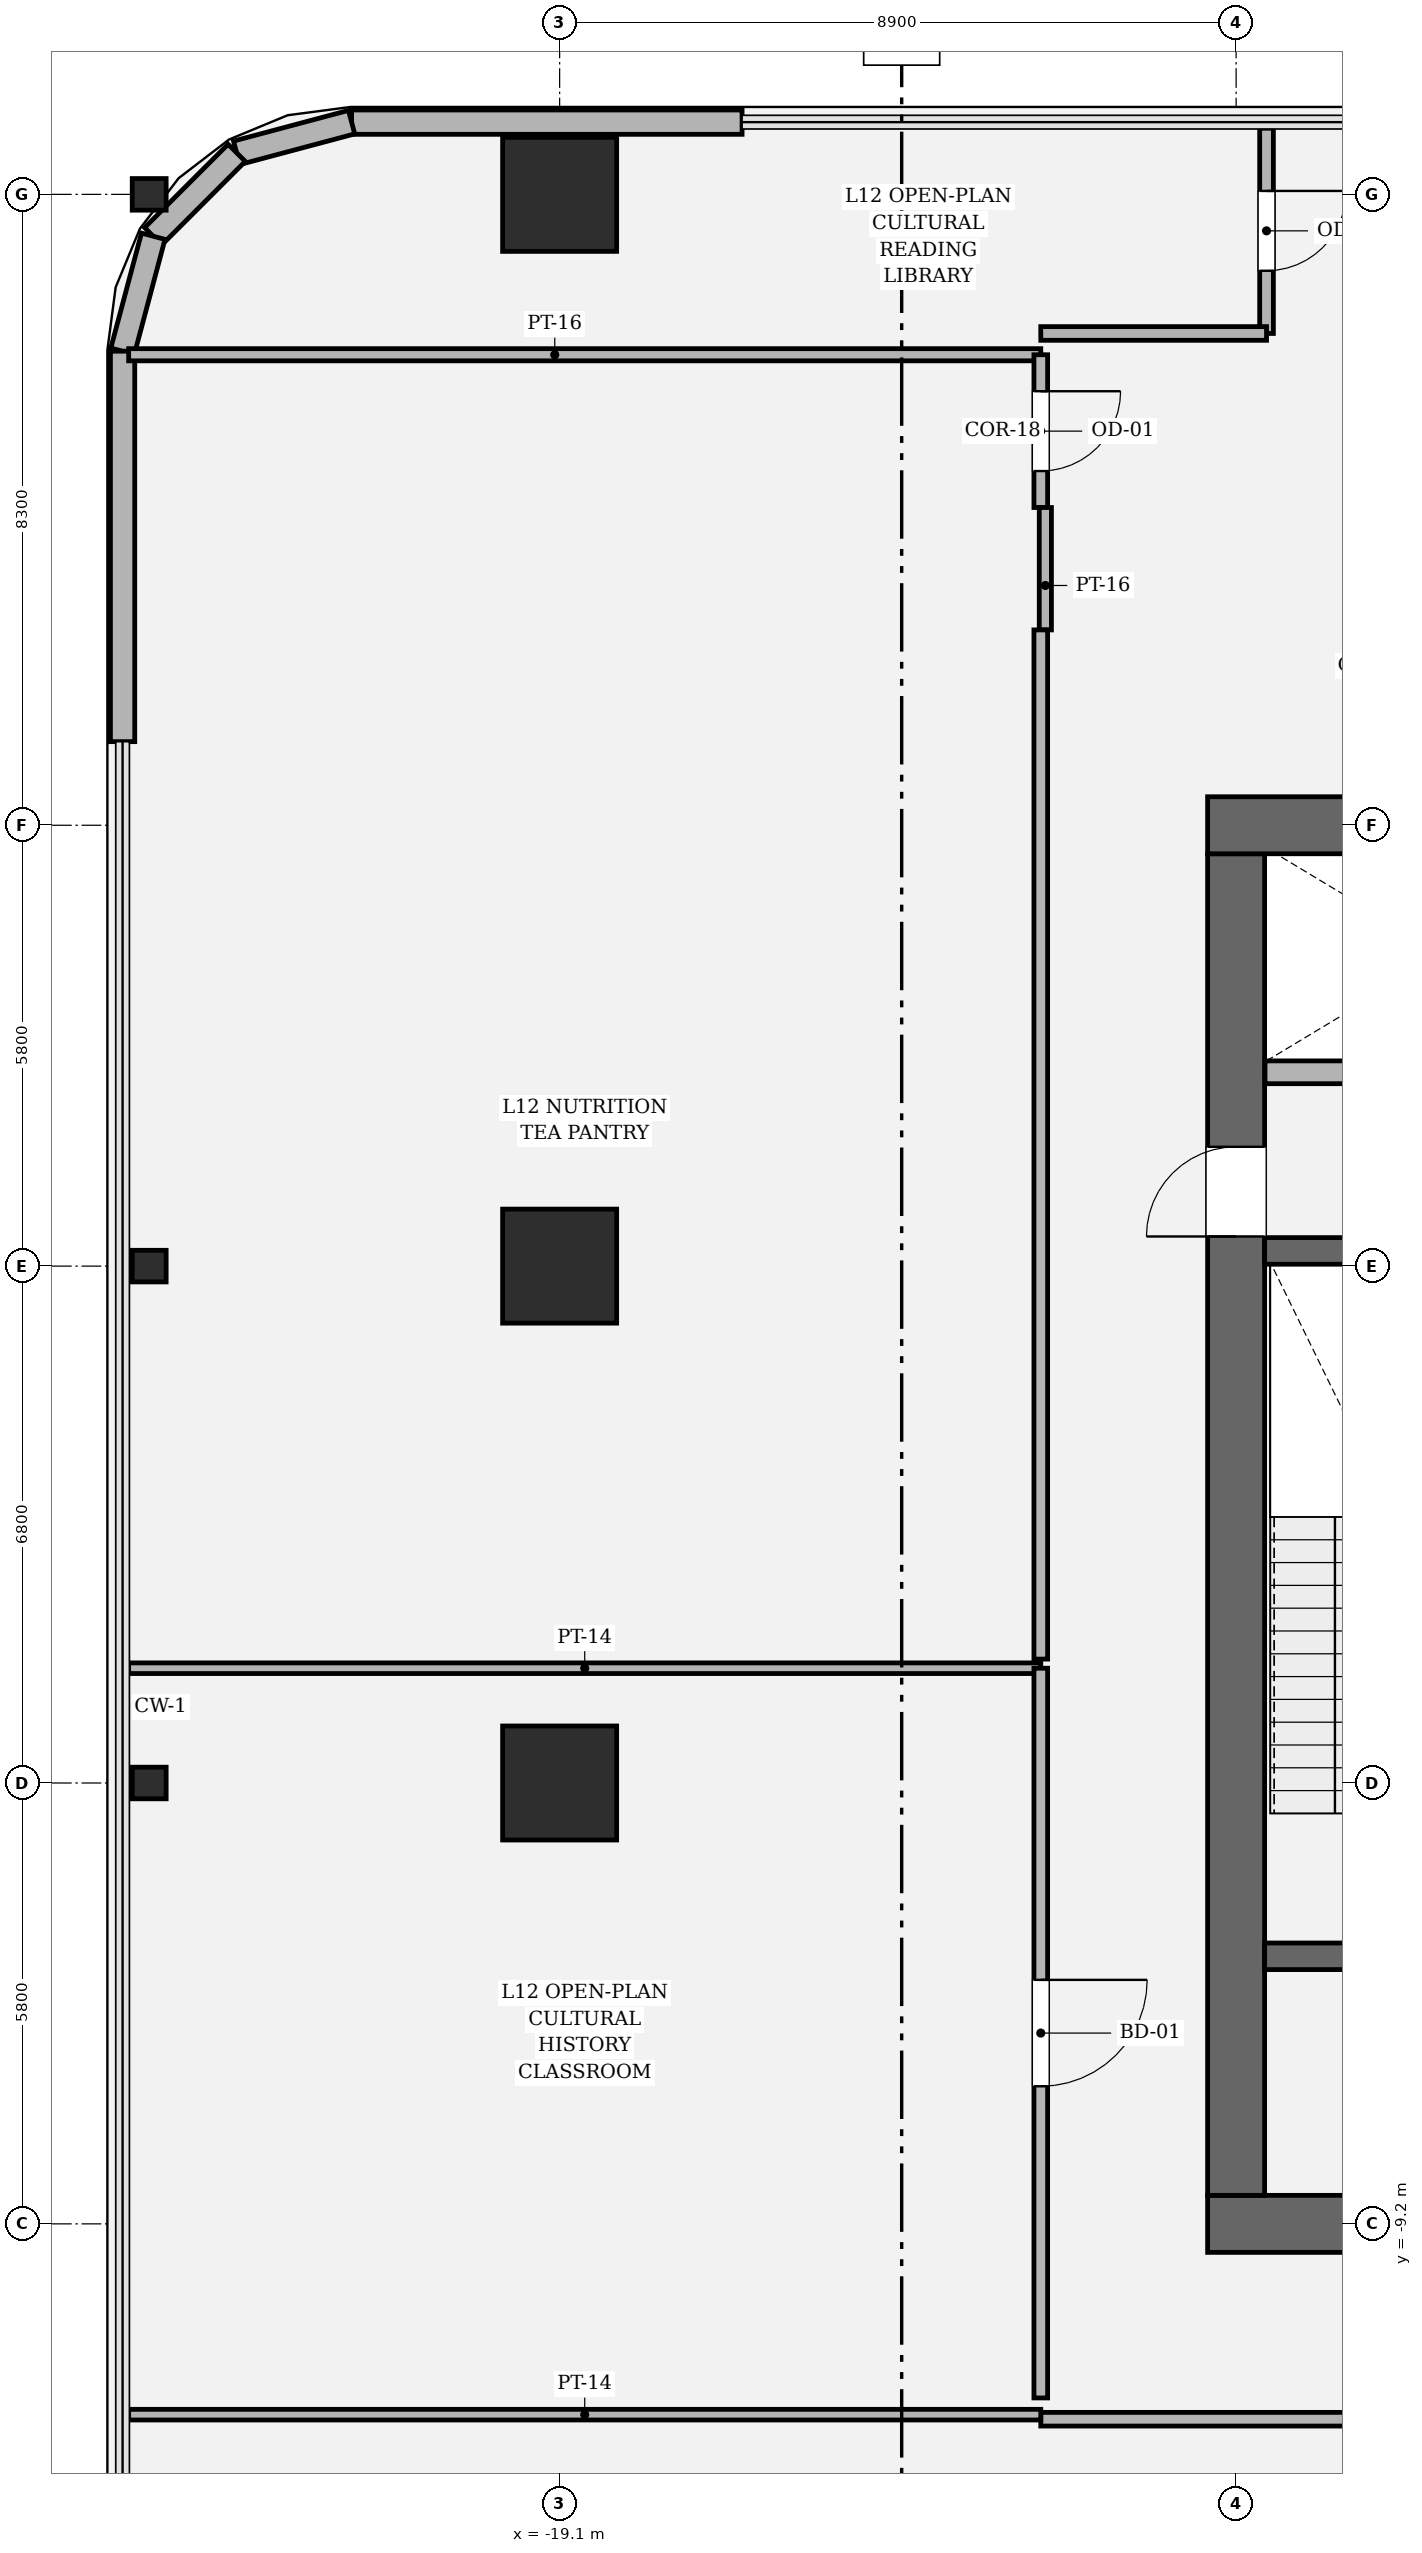
"""IFC4 building model, lengths in metres.
Left out: names, types, materials, properties, quantities, classifications, styles, units other than length and angle.
Written with IfcOpenShell. Run it as: python <this file> out.ifc"""

import sys

from ifc_helpers import new_model, si_unit, direction, frame, frame_2d, origin, origin_2d, place, context, subcontext, project, spatial, rectangle, hollow_rectangle, i_section, extrude, element, fill, save


model = new_model("IFC4")
c1 = context("Model", 3, precision=1e-05, world=origin(), true_north=direction((0.0, 1.0)))
c2 = subcontext(c1, "Body", "Model", "MODEL_VIEW")
j1 = project(units=[si_unit("LENGTHUNIT", "METRE"), si_unit("PLANEANGLEUNIT", "RADIAN")], contexts=[c1])
p1 = place(None, origin())
s1 = spatial("IfcSite", under=j1, at=p1, CompositionType="ELEMENT")
p2 = place(p1, origin())
s2 = spatial("IfcBuilding", under=s1, at=p2, CompositionType="ELEMENT")
p3 = place(p2, frame((0.0, 0.0, 56.55)))
s3 = spatial("IfcBuildingStorey", under=s2, at=p3, CompositionType="ELEMENT", Elevation=56.55)
p4 = place(p3, frame((10.575, -9.2, 0.0), z_axis=(0.0, 0.0, 1.0), x_axis=(-1.0, 0.0, 0.0)))
e1 = element("IfcWall", 1, at=p4, inside=s3, PredefinedType="SHEAR", context=c2, shape_type="SweptSolid", body=[
    extrude(rectangle(XDim=21.15, YDim=0.75, at=frame_2d((10.575, 0.0))), origin(), (0.0, 0.0, 1.0), 4.05),
])
p5 = place(p4, frame((2.85, 0.0, 0.0)))
e2 = element("IfcOpeningElement", 2, at=p5, cuts=e1, PredefinedType="OPENING", context=c2, shape_type="SweptSolid", body=[
    extrude(rectangle(XDim=1.25, YDim=2.25, at=frame_2d((0.625, 1.125))), frame((0.0, 0.385, 0.0), z_axis=(0.0, -1.0, 0.0), x_axis=(1.0, 0.0, 0.0)), (0.0, 0.0, 1.0), 0.77),
])
p6 = place(p4, frame((17.05, 0.0, 0.0)))
e3 = element("IfcOpeningElement", 3, at=p6, cuts=e1, PredefinedType="OPENING", context=c2, shape_type="SweptSolid", body=[
    extrude(rectangle(XDim=1.25, YDim=2.25, at=frame_2d((0.625, 1.125))), frame((0.0, 0.385, 0.0), z_axis=(0.0, -1.0, 0.0), x_axis=(1.0, 0.0, 0.0)), (0.0, 0.0, 1.0), 0.77),
])
p7 = place(p3, frame((-10.2, -8.825, 0.0), z_axis=(0.0, 0.0, 1.0), x_axis=(0.0, 1.0, 0.0)))
e4 = element("IfcWall", 4, at=p7, inside=s3, PredefinedType="SHEAR", context=c2, shape_type="SweptSolid", body=[
    extrude(rectangle(XDim=17.65, YDim=0.75, at=frame_2d((8.825, 0.0))), origin(), (0.0, 0.0, 1.0), 4.05),
])
p8 = place(p7, frame((12.615, 0.0, 0.0)))
e5 = element("IfcOpeningElement", 5, at=p8, cuts=e4, PredefinedType="OPENING", context=c2, shape_type="SweptSolid", body=[
    extrude(rectangle(XDim=1.18, YDim=2.2, at=frame_2d((0.59, 1.1))), frame((0.0, 0.385, 0.0), z_axis=(0.0, -1.0, 0.0), x_axis=(1.0, 0.0, 0.0)), (0.0, 0.0, 1.0), 0.77),
])
p9 = place(p3, frame((-10.575, 9.2, 0.0), z_axis=(0.0, 0.0, 1.0), x_axis=(1.0, 0.0, 0.0)))
e6 = element("IfcWall", 6, at=p9, inside=s3, PredefinedType="SHEAR", context=c2, shape_type="SweptSolid", body=[
    extrude(rectangle(XDim=21.15, YDim=0.75, at=frame_2d((10.575, 0.0))), origin(), (0.0, 0.0, 1.0), 4.05),
])
p10 = place(p3, frame((-9.825, -5.68, 0.0), z_axis=(0.0, 0.0, 1.0), x_axis=(1.0, 0.0, 0.0)))
e7 = element("IfcWall", 7, at=p10, inside=s3, PredefinedType="SOLIDWALL", context=c2, shape_type="SweptSolid", body=[
    extrude(rectangle(XDim=5.175, YDim=0.35, at=frame_2d((2.587, 0.0))), origin(), (0.0, 0.0, 1.0), 4.05),
])
p11 = place(p10, frame((1.285, 0.0, 0.0)))
e8 = element("IfcOpeningElement", 8, at=p11, cuts=e7, PredefinedType="OPENING", context=c2, shape_type="SweptSolid", body=[
    extrude(rectangle(XDim=1.18, YDim=2.2, at=frame_2d((0.59, 1.1))), frame((0.0, 0.185, 0.0), z_axis=(0.0, -1.0, 0.0), x_axis=(1.0, 0.0, 0.0)), (0.0, 0.0, 1.0), 0.37),
])
p12 = place(p3, frame((-9.825, 3.6, 0.0), z_axis=(0.0, 0.0, 1.0), x_axis=(1.0, 0.0, 0.0)))
e9 = element("IfcWall", 9, at=p12, inside=s3, PredefinedType="SOLIDWALL", context=c2, shape_type="SweptSolid", body=[
    extrude(rectangle(XDim=5.175, YDim=0.35, at=frame_2d((2.587, 0.0))), origin(), (0.0, 0.0, 1.0), 4.05),
])
for number, where, z_axis, x_axis in (
    (10, (-19.1, 17.5, 0.0), (0.0, 0.0, 1.0), (1.0, 0.0, 0.0)),
    (11, (-19.1, 3.4, 0.0), (0.0, 0.0, 1.0), (1.0, 0.0, 0.0)),
    (12, (-19.1, -3.4, 0.0), (0.0, 0.0, 1.0), (1.0, 0.0, 0.0)),
):
    element("IfcColumn", number, at=place(p3, frame(where, z_axis=z_axis, x_axis=x_axis)), inside=s3, PredefinedType="COLUMN", context=c2, shape_type="SweptSolid", body=[
        extrude(hollow_rectangle(XDim=1.5, YDim=1.5, WallThickness=0.045, at=origin_2d()), origin(), (0.0, 0.0, 1.0), 4.05),
    ])
for number, where, z_axis, x_axis in (
    (13, (-24.5, -3.4, 0.0), (0.0, 0.0, 1.0), (0.0, 1.0, 0.0)),
    (14, (-24.5, 3.4, 0.0), (0.0, 0.0, 1.0), (0.0, 1.0, 0.0)),
    (15, (-24.5, 17.5, 0.0), (0.0, 0.0, 1.0), (0.0, 1.0, 0.0)),
):
    element("IfcColumn", number, at=place(p3, frame(where, z_axis=z_axis, x_axis=x_axis)), inside=s3, PredefinedType="COLUMN", context=c2, shape_type="SweptSolid", body=[
        extrude(i_section(OverallWidth=0.416, OverallDepth=0.446, WebThickness=0.039, FlangeThickness=0.062, FilletRadius=0.018, at=origin_2d()), origin(), (0.0, 0.0, 1.0), 4.048),
    ])
p13 = place(p3, frame((-16.7, 18.45, 0.0), z_axis=(0.0, 0.0, 1.0), x_axis=(-1.0, 0.0, 0.0)))
e16 = element("IfcWall", 16, at=p13, inside=s3, PredefinedType="SOLIDWALL", context=c2, shape_type="SweptSolid", body=[
    extrude(rectangle(XDim=5.137, YDim=0.32, at=frame_2d((2.568, 0.0))), origin(), (0.0, 0.0, 1.0), 3.77),
])
p14 = place(p3, frame((-21.837, 18.45, 0.0), z_axis=(0.0, 0.0, 1.0), x_axis=(-0.966224582397, -0.257701486942, 0.0)))
e17 = element("IfcWall", 17, at=p14, inside=s3, PredefinedType="SOLIDWALL", context=c2, shape_type="SweptSolid", body=[
    extrude(rectangle(XDim=1.565, YDim=0.32, at=frame_2d((0.783, 0.0))), origin(), (0.0, 0.0, 1.0), 3.77),
])
p15 = place(p3, frame((-23.349, 18.047, 0.0), z_axis=(0.0, 0.0, 1.0), x_axis=(-0.707106781187, -0.707106781187, 0.0)))
e18 = element("IfcWall", 18, at=p15, inside=s3, PredefinedType="SOLIDWALL", context=c2, shape_type="SweptSolid", body=[
    extrude(rectangle(XDim=1.552, YDim=0.32, at=frame_2d((0.776, 0.0))), origin(), (0.0, 0.0, 1.0), 3.77),
])
p16 = place(p3, frame((-24.447, 16.949, 0.0), z_axis=(0.0, 0.0, 1.0), x_axis=(-0.257847112249, -0.966185730957, 0.0)))
e19 = element("IfcWall", 19, at=p16, inside=s3, PredefinedType="SOLIDWALL", context=c2, shape_type="SweptSolid", body=[
    extrude(rectangle(XDim=1.565, YDim=0.32, at=frame_2d((0.783, 0.0))), origin(), (0.0, 0.0, 1.0), 3.77),
])
p17 = place(p3, frame((-24.85, 15.437, 0.0), z_axis=(0.0, 0.0, 1.0), x_axis=(0.0, -1.0, 0.0)))
e20 = element("IfcWall", 20, at=p17, inside=s3, PredefinedType="SOLIDWALL", context=c2, shape_type="SweptSolid", body=[
    extrude(rectangle(XDim=5.137, YDim=0.32, at=frame_2d((2.568, 0.0))), origin(), (0.0, 0.0, 1.0), 3.77),
])
p18 = place(p3, frame((-9.82, 5.95, 0.0), z_axis=(0.0, 0.0, 1.0), x_axis=(1.0, 0.0, 0.0)))
e21 = element("IfcWall", 21, at=p18, inside=s3, PredefinedType="SOLIDWALL", context=c2, shape_type="SweptSolid", body=[
    extrude(rectangle(XDim=4.76, YDim=0.3, at=frame_2d((2.38, 0.0))), origin(), (0.0, 0.0, 1.0), 3.77),
])
p19 = place(p3, frame((-12.77, -11.77, 0.0), z_axis=(0.0, 0.0, 1.0), x_axis=(1.0, 0.0, 0.0)))
e22 = element("IfcWall", 22, at=p19, inside=s3, PredefinedType="PARTITIONING", context=c2, shape_type="SweptSolid", body=[
    extrude(rectangle(XDim=11.57, YDim=0.18, at=frame_2d((5.785, 0.0))), origin(), (0.0, 0.0, 1.0), 2.444),
])
p20 = place(p19, frame((5.26, 0.0, 0.0)))
e23 = element("IfcOpeningElement", 23, at=p20, cuts=e22, PredefinedType="OPENING", context=c2, shape_type="SweptSolid", body=[
    extrude(rectangle(XDim=1.05, YDim=2.2, at=frame_2d((0.525, 1.1))), frame((0.0, 0.1, 0.0), z_axis=(0.0, -1.0, 0.0), x_axis=(1.0, 0.0, 0.0)), (0.0, 0.0, 1.0), 0.2),
])
for number, where, z_axis, x_axis in (
    (24, (-24.77, -11.71, 0.0), (0.0, 0.0, 1.0), (1.0, 0.0, 0.0)),
    (25, (-24.77, -1.89, 0.0), (0.0, 0.0, 1.0), (1.0, 0.0, 0.0)),
):
    element("IfcWall", number, at=place(p3, frame(where, z_axis=z_axis, x_axis=x_axis)), inside=s3, PredefinedType="PARTITIONING", context=c2, shape_type="SweptSolid", body=[
        extrude(rectangle(XDim=12.0, YDim=0.14, at=frame_2d((6.0, 0.0))), origin(), (0.0, 0.0, 1.0), 2.444),
    ])
p21 = place(p3, frame((-12.77, -1.89, 0.0), z_axis=(0.0, 0.0, 1.0), x_axis=(0.0, -1.0, 0.0)))
e26 = element("IfcWall", 26, at=p21, inside=s3, PredefinedType="PARTITIONING", context=c2, shape_type="SweptSolid", body=[
    extrude(rectangle(XDim=9.6, YDim=0.18, at=frame_2d((4.8, 0.0))), origin(), (0.0, 0.0, 1.0), 2.444),
])
p22 = place(p21, frame((4.1, 0.0, 0.0)))
e27 = element("IfcOpeningElement", 27, at=p22, cuts=e26, PredefinedType="OPENING", context=c2, shape_type="SweptSolid", body=[
    extrude(rectangle(XDim=1.4, YDim=2.25, at=frame_2d((0.7, 1.125))), frame((0.0, 0.1, 0.0), z_axis=(0.0, -1.0, 0.0), x_axis=(1.0, 0.0, 0.0)), (0.0, 0.0, 1.0), 0.2),
])
p23 = place(p3, frame((-24.77, 15.39, 0.0), z_axis=(0.0, 0.0, 1.0), x_axis=(1.0, 0.0, 0.0)))
e28 = element("IfcWall", 28, at=p23, inside=s3, PredefinedType="PARTITIONING", context=c2, shape_type="SweptSolid", body=[
    extrude(rectangle(XDim=12.0, YDim=0.16, at=frame_2d((6.0, 0.0))), origin(), (0.0, 0.0, 1.0), 2.444),
])
p24 = place(p3, frame((-12.77, 15.39, 0.0), z_axis=(0.0, 0.0, 1.0), x_axis=(0.0, -1.0, 0.0)))
e29 = element("IfcWall", 29, at=p24, inside=s3, PredefinedType="PARTITIONING", context=c2, shape_type="SweptSolid", body=[
    extrude(rectangle(XDim=2.01, YDim=0.18, at=frame_2d((1.005, 0.0))), origin(), (0.0, 0.0, 1.0), 3.314),
])
p25 = place(p24, frame((0.48, 0.0, 0.0)))
e30 = element("IfcOpeningElement", 30, at=p25, cuts=e29, PredefinedType="OPENING", context=c2, shape_type="SweptSolid", body=[
    extrude(rectangle(XDim=1.05, YDim=2.2, at=frame_2d((0.525, 1.1))), frame((0.0, 0.1, 0.0), z_axis=(0.0, -1.0, 0.0), x_axis=(1.0, 0.0, 0.0)), (0.0, 0.0, 1.0), 0.2),
])
p26 = place(p3, frame((-12.71, 13.38, 0.0), z_axis=(0.0, 0.0, 1.0), x_axis=(0.0, -1.0, 0.0)))
e31 = element("IfcWall", 31, at=p26, inside=s3, PredefinedType="PARTITIONING", context=c2, shape_type="SweptSolid", body=[
    extrude(rectangle(XDim=1.61, YDim=0.16, at=frame_2d((0.805, 0.0))), origin(), (0.0, 0.0, 1.0), 3.314),
])
p27 = place(p3, frame((-12.77, 11.77, 0.0), z_axis=(0.0, 0.0, 1.0), x_axis=(0.0, -1.0, 0.0)))
e32 = element("IfcWall", 32, at=p27, inside=s3, PredefinedType="PARTITIONING", context=c2, shape_type="SweptSolid", body=[
    extrude(rectangle(XDim=13.54, YDim=0.18, at=frame_2d((6.77, 0.0))), origin(), (0.0, 0.0, 1.0), 2.444),
])
p28 = place(p3, frame((-9.8, 18.37, 0.0), z_axis=(0.0, 0.0, 1.0), x_axis=(0.0, -1.0, 0.0)))
e33 = element("IfcWall", 33, at=p28, inside=s3, PredefinedType="PARTITIONING", context=c2, shape_type="SweptSolid", body=[
    extrude(rectangle(XDim=2.7, YDim=0.18, at=frame_2d((1.35, 0.0))), origin(), (0.0, 0.0, 1.0), 2.444),
])
p29 = place(p28, frame((0.825, 0.0, 0.0)))
e34 = element("IfcOpeningElement", 34, at=p29, cuts=e33, PredefinedType="OPENING", context=c2, shape_type="SweptSolid", body=[
    extrude(rectangle(XDim=1.05, YDim=2.2, at=frame_2d((0.525, 1.1))), frame((0.0, 0.1, 0.0), z_axis=(0.0, -1.0, 0.0), x_axis=(1.0, 0.0, 0.0)), (0.0, 0.0, 1.0), 0.2),
])
p30 = place(p3, frame((-9.8, 15.67, 0.0), z_axis=(0.0, 0.0, 1.0), x_axis=(-1.0, 0.0, 0.0)))
e35 = element("IfcWall", 35, at=p30, inside=s3, PredefinedType="PARTITIONING", context=c2, shape_type="SweptSolid", body=[
    extrude(rectangle(XDim=2.97, YDim=0.18, at=frame_2d((1.485, 0.0))), origin(), (0.0, 0.0, 1.0), 2.444),
])
p31 = place(p8, origin())
e36 = element("IfcDoor", 36, at=p31, inside=s3, OperationType="SINGLE_SWING_LEFT", PredefinedType="DOOR", context=c2, shape_type="SweptSolid", body=[
    extrude(rectangle(XDim=1.18, YDim=2.2, at=frame_2d((0.59, 1.1))), frame((0.0, 0.025, 0.0), z_axis=(0.0, -1.0, 0.0), x_axis=(1.0, 0.0, 0.0)), (0.0, 0.0, 1.0), 0.05),
])
fill(e5, e36)
p32 = place(p22, origin())
e37 = element("IfcDoor", 37, at=p32, inside=s3, OperationType="SINGLE_SWING_LEFT", PredefinedType="DOOR", context=c2, shape_type="SweptSolid", body=[
    extrude(rectangle(XDim=1.4, YDim=2.25, at=frame_2d((0.7, 1.125))), frame((0.0, 0.025, 0.0), z_axis=(0.0, -1.0, 0.0), x_axis=(1.0, 0.0, 0.0)), (0.0, 0.0, 1.0), 0.05),
])
fill(e27, e37)
p33 = place(p25, origin())
e38 = element("IfcDoor", 38, at=p33, inside=s3, OperationType="SINGLE_SWING_LEFT", PredefinedType="DOOR", context=c2, shape_type="SweptSolid", body=[
    extrude(rectangle(XDim=1.05, YDim=2.2, at=frame_2d((0.525, 1.1))), frame((0.0, 0.025, 0.0), z_axis=(0.0, -1.0, 0.0), x_axis=(1.0, 0.0, 0.0)), (0.0, 0.0, 1.0), 0.05),
])
fill(e30, e38)
p34 = place(p29, origin())
e39 = element("IfcDoor", 39, at=p34, inside=s3, OperationType="SINGLE_SWING_LEFT", PredefinedType="DOOR", context=c2, shape_type="SweptSolid", body=[
    extrude(rectangle(XDim=1.05, YDim=2.2, at=frame_2d((0.525, 1.1))), frame((0.0, 0.025, 0.0), z_axis=(0.0, -1.0, 0.0), x_axis=(1.0, 0.0, 0.0)), (0.0, 0.0, 1.0), 0.05),
])
fill(e34, e39)
save(model, sys.argv[1])
